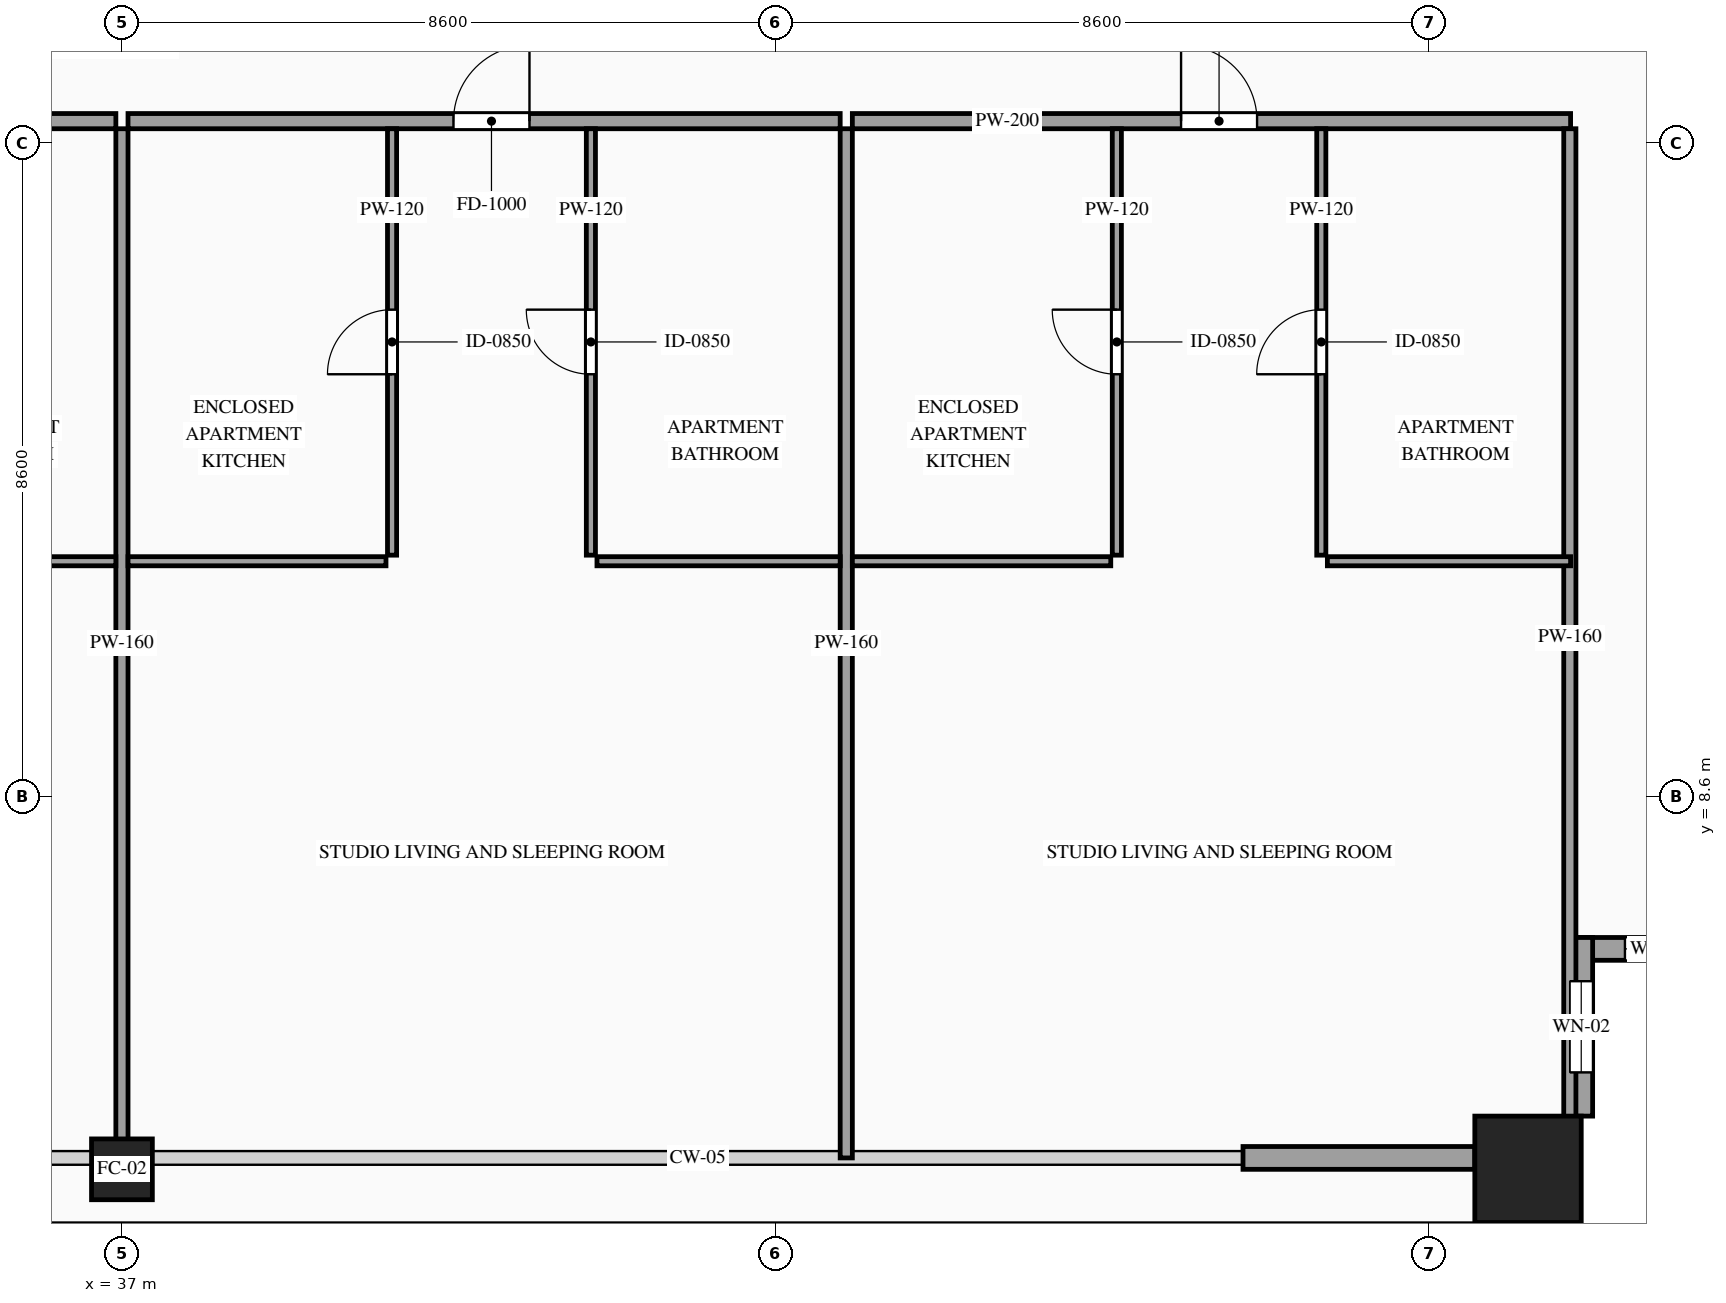
"""IFC4 building model, lengths in metres.
Left out: names, types, materials, properties, quantities, classifications, styles, units other than length and angle.
Written with IfcOpenShell. Run it as: python <this file> out.ifc"""

import sys

from ifc_helpers import new_model, si_unit, direction, frame, frame_2d, origin, origin_2d, place, context, subcontext, project, spatial, rectangle, hollow_rectangle, extrude, source, transform, mapped, element, fill, save


model = new_model("IFC4")
c1 = context("Model", 3, precision=1e-05, world=origin(), true_north=direction((0.0, 1.0)))
c2 = subcontext(c1, "Body", "Model", "MODEL_VIEW")
j1 = project(units=[si_unit("LENGTHUNIT", "METRE"), si_unit("PLANEANGLEUNIT", "RADIAN")], contexts=[c1])
p1 = place(None, origin())
s1 = spatial("IfcSite", under=j1, at=p1, CompositionType="ELEMENT")
p2 = place(p1, origin())
s2 = spatial("IfcBuilding", under=s1, at=p2, CompositionType="ELEMENT")
p3 = place(p2, frame((0.0, 0.0, 188.0)))
s3 = spatial("IfcBuildingStorey", under=s2, at=p3, CompositionType="ELEMENT", Elevation=188.0)
m1 = source(origin(), c2, "Body", "SweptSolid", [
    extrude(hollow_rectangle(XDim=0.8, YDim=0.8, WallThickness=0.036, at=origin_2d()), origin(), (0.0, 0.0, 1.0), 3.5),
])
p4 = place(p3, frame((37.0, 3.7, 0.0), z_axis=(0.0, 0.0, 1.0), x_axis=(1.0, 0.0, 0.0)))
e1 = element("IfcColumn", 1, at=p4, inside=s3, PredefinedType="COLUMN", context=c2, shape_type="MappedRepresentation", body=[
    mapped(m1, transform((0.0, 0.0, 0.0), scale=1.0)),
])
m2 = source(origin(), c2, "Body", "SweptSolid", [
    extrude(hollow_rectangle(XDim=1.4, YDim=1.4, WallThickness=0.06, at=origin_2d()), origin(), (0.0, 0.0, 1.0), 3.5),
])
p5 = place(p3, frame((55.5, 3.7, 0.0), z_axis=(0.0, 0.0, 1.0), x_axis=(1.0, 0.0, 0.0)))
e2 = element("IfcColumn", 2, at=p5, inside=s3, PredefinedType="COLUMN", context=c2, shape_type="MappedRepresentation", body=[
    mapped(m2, transform((0.0, 0.0, 0.0), scale=1.0)),
])
p6 = place(p3, frame((56.05, 6.6, 0.0), z_axis=(0.0, 0.0, 1.0), x_axis=(1.0, 0.0, 0.0)))
e3 = element("IfcWall", 3, at=p6, inside=s3, PredefinedType="SOLIDWALL", context=c2, shape_type="SweptSolid", body=[
    extrude(rectangle(XDim=2.35, YDim=0.3, at=frame_2d((1.175, 0.0))), origin(), (0.0, 0.0, 1.0), 3.28),
])
p7 = place(p6, frame((0.725, 0.0, 0.85)))
e4 = element("IfcOpeningElement", 4, at=p7, cuts=e3, PredefinedType="OPENING", context=c2, shape_type="SweptSolid", body=[
    extrude(rectangle(XDim=0.9, YDim=1.5, at=frame_2d((0.45, 0.75))), frame((0.0, 0.165, 0.0), z_axis=(0.0, -1.0, 0.0), x_axis=(1.0, 0.0, 0.0)), (0.0, 0.0, 1.0), 0.33),
])
p8 = place(p3, frame((56.2, 4.4, 0.0), z_axis=(0.0, 0.0, 1.0), x_axis=(0.0, 1.0, 0.0)))
e5 = element("IfcWall", 5, at=p8, inside=s3, PredefinedType="SOLIDWALL", context=c2, shape_type="SweptSolid", body=[
    extrude(rectangle(XDim=2.35, YDim=0.3, at=frame_2d((1.175, 0.0))), origin(), (0.0, 0.0, 1.0), 3.28),
])
p9 = place(p8, frame((0.575, 0.0, 0.85)))
e6 = element("IfcOpeningElement", 6, at=p9, cuts=e5, PredefinedType="OPENING", context=c2, shape_type="SweptSolid", body=[
    extrude(rectangle(XDim=1.2, YDim=2.1, at=frame_2d((0.6, 1.05))), frame((0.0, 0.165, 0.0), z_axis=(0.0, -1.0, 0.0), x_axis=(1.0, 0.0, 0.0)), (0.0, 0.0, 1.0), 0.33),
])
m3 = source(origin(), c2, "Body", "SweptSolid", [
    extrude(rectangle(XDim=3.05, YDim=0.3, at=frame_2d((1.525, 0.0))), origin(), (0.0, 0.0, 1.0), 2.835),
])
p10 = place(p3, frame((51.75, 3.85, 0.0), z_axis=(0.0, 0.0, 1.0), x_axis=(1.0, 0.0, 0.0)))
e7 = element("IfcWall", 7, at=p10, inside=s3, PredefinedType="SOLIDWALL", context=c2, shape_type="MappedRepresentation", body=[
    mapped(m3, transform((0.0, 0.0, 0.0), scale=1.0)),
])
p11 = place(p3, frame((27.55, 17.49, 0.0), z_axis=(0.0, 0.0, 1.0), x_axis=(1.0, 0.0, 0.0)))
e8 = element("IfcWall", 8, at=p11, inside=s3, PredefinedType="PARTITIONING", context=c2, shape_type="SweptSolid", body=[
    extrude(rectangle(XDim=9.37, YDim=0.2, at=frame_2d((4.685, 0.0))), origin(), (0.0, 0.0, 1.0), 3.28),
])
p12 = place(p11, frame((4.282, 0.0, 0.0)))
e9 = element("IfcOpeningElement", 9, at=p12, cuts=e8, PredefinedType="OPENING", context=c2, shape_type="SweptSolid", body=[
    extrude(rectangle(XDim=1.0, YDim=2.2, at=frame_2d((0.5, 1.1))), frame((0.0, 0.115, 0.0), z_axis=(0.0, -1.0, 0.0), x_axis=(1.0, 0.0, 0.0)), (0.0, 0.0, 1.0), 0.23),
])
m4 = source(origin(), c2, "Body", "SweptSolid", [
    extrude(rectangle(XDim=13.54, YDim=0.16, at=frame_2d((6.77, 0.0))), origin(), (0.0, 0.0, 1.0), 2.687),
])
p13 = place(p3, frame((37.0, 3.85, 0.0), z_axis=(0.0, 0.0, 1.0), x_axis=(0.0, 1.0, 0.0)))
e10 = element("IfcWall", 10, at=p13, inside=s3, PredefinedType="PARTITIONING", context=c2, shape_type="MappedRepresentation", body=[
    mapped(m4, transform((0.0, 0.0, 0.0), scale=1.0)),
])
m5 = source(origin(), c2, "Body", "SweptSolid", [
    extrude(rectangle(XDim=3.2, YDim=0.12, at=frame_2d((1.6, 0.0))), origin(), (0.0, 0.0, 1.0), 2.875),
])
p14 = place(p3, frame((33.72, 11.7, 0.0), z_axis=(0.0, 0.0, 1.0), x_axis=(1.0, 0.0, 0.0)))
e11 = element("IfcWall", 11, at=p14, inside=s3, PredefinedType="PARTITIONING", context=c2, shape_type="MappedRepresentation", body=[
    mapped(m5, transform((0.0, 0.0, 0.0), scale=1.0)),
])
p15 = place(p3, frame((37.08, 17.49, 0.0), z_axis=(0.0, 0.0, 1.0), x_axis=(1.0, 0.0, 0.0)))
e12 = element("IfcWall", 12, at=p15, inside=s3, PredefinedType="PARTITIONING", context=c2, shape_type="SweptSolid", body=[
    extrude(rectangle(XDim=9.37, YDim=0.2, at=frame_2d((4.685, 0.0))), origin(), (0.0, 0.0, 1.0), 3.28),
])
p16 = place(p15, frame((4.282, 0.0, 0.0)))
e13 = element("IfcOpeningElement", 13, at=p16, cuts=e12, PredefinedType="OPENING", context=c2, shape_type="SweptSolid", body=[
    extrude(rectangle(XDim=1.0, YDim=2.2, at=frame_2d((0.5, 1.1))), frame((0.0, 0.115, 0.0), z_axis=(0.0, -1.0, 0.0), x_axis=(1.0, 0.0, 0.0)), (0.0, 0.0, 1.0), 0.23),
])
m6 = source(origin(), c2, "Body", "SweptSolid", [
    extrude(rectangle(XDim=13.54, YDim=0.16, at=frame_2d((6.77, 0.0))), origin(), (0.0, 0.0, 1.0), 3.28),
])
p17 = place(p3, frame((46.53, 3.85, 0.0), z_axis=(0.0, 0.0, 1.0), x_axis=(0.0, 1.0, 0.0)))
e14 = element("IfcWall", 14, at=p17, inside=s3, PredefinedType="PARTITIONING", context=c2, shape_type="MappedRepresentation", body=[
    mapped(m6, transform((0.0, 0.0, 0.0), scale=1.0)),
])
m7 = source(origin(), c2, "Body", "SweptSolid", [
    extrude(rectangle(XDim=3.394, YDim=0.12, at=frame_2d((1.697, 0.0))), origin(), (0.0, 0.0, 1.0), 2.875),
])
p18 = place(p3, frame((37.08, 11.7, 0.0), z_axis=(0.0, 0.0, 1.0), x_axis=(1.0, 0.0, 0.0)))
e15 = element("IfcWall", 15, at=p18, inside=s3, PredefinedType="PARTITIONING", context=c2, shape_type="MappedRepresentation", body=[
    mapped(m7, transform((0.0, 0.0, 0.0), scale=1.0)),
])
p19 = place(p3, frame((40.554, 11.78, 0.0), z_axis=(0.0, 0.0, 1.0), x_axis=(0.0, 1.0, 0.0)))
e16 = element("IfcWall", 16, at=p19, inside=s3, PredefinedType="PARTITIONING", context=c2, shape_type="SweptSolid", body=[
    extrude(rectangle(XDim=5.61, YDim=0.12, at=frame_2d((2.805, 0.0))), origin(), (0.0, 0.0, 1.0), 3.28),
])
p20 = place(p19, frame((2.38, 0.0, 0.0)))
e17 = element("IfcOpeningElement", 17, at=p20, cuts=e16, PredefinedType="OPENING", context=c2, shape_type="SweptSolid", body=[
    extrude(rectangle(XDim=0.85, YDim=2.1, at=frame_2d((0.425, 1.05))), frame((0.0, 0.075, 0.0), z_axis=(0.0, -1.0, 0.0), x_axis=(1.0, 0.0, 0.0)), (0.0, 0.0, 1.0), 0.15),
])
p21 = place(p3, frame((43.25, 11.7, 0.0), z_axis=(0.0, 0.0, 1.0), x_axis=(1.0, 0.0, 0.0)))
e18 = element("IfcWall", 18, at=p21, inside=s3, PredefinedType="PARTITIONING", context=c2, shape_type="MappedRepresentation", body=[
    mapped(m5, transform((0.0, 0.0, 0.0), scale=1.0)),
])
p22 = place(p3, frame((43.17, 11.78, 0.0), z_axis=(0.0, 0.0, 1.0), x_axis=(0.0, 1.0, 0.0)))
e19 = element("IfcWall", 19, at=p22, inside=s3, PredefinedType="PARTITIONING", context=c2, shape_type="SweptSolid", body=[
    extrude(rectangle(XDim=5.61, YDim=0.12, at=frame_2d((2.805, 0.0))), origin(), (0.0, 0.0, 1.0), 3.28),
])
p23 = place(p22, frame((2.38, 0.0, 0.0)))
e20 = element("IfcOpeningElement", 20, at=p23, cuts=e19, PredefinedType="OPENING", context=c2, shape_type="SweptSolid", body=[
    extrude(rectangle(XDim=0.85, YDim=2.1, at=frame_2d((0.425, 1.05))), frame((0.0, 0.075, 0.0), z_axis=(0.0, -1.0, 0.0), x_axis=(1.0, 0.0, 0.0)), (0.0, 0.0, 1.0), 0.15),
])
p24 = place(p3, frame((46.61, 17.49, 0.0), z_axis=(0.0, 0.0, 1.0), x_axis=(1.0, 0.0, 0.0)))
e21 = element("IfcWall", 21, at=p24, inside=s3, PredefinedType="PARTITIONING", context=c2, shape_type="SweptSolid", body=[
    extrude(rectangle(XDim=9.45, YDim=0.2, at=frame_2d((4.725, 0.0))), origin(), (0.0, 0.0, 1.0), 3.28),
])
p25 = place(p24, frame((4.325, 0.0, 0.0)))
e22 = element("IfcOpeningElement", 22, at=p25, cuts=e21, PredefinedType="OPENING", context=c2, shape_type="SweptSolid", body=[
    extrude(rectangle(XDim=1.0, YDim=2.2, at=frame_2d((0.5, 1.1))), frame((0.0, 0.115, 0.0), z_axis=(0.0, -1.0, 0.0), x_axis=(1.0, 0.0, 0.0)), (0.0, 0.0, 1.0), 0.23),
])
m8 = source(origin(), c2, "Body", "SweptSolid", [
    extrude(rectangle(XDim=13.39, YDim=0.16, at=frame_2d((6.695, 0.0))), origin(), (0.0, 0.0, 1.0), 3.28),
])
p26 = place(p3, frame((56.05, 4.0, 0.0), z_axis=(0.0, 0.0, 1.0), x_axis=(0.0, 1.0, 0.0)))
e23 = element("IfcWall", 23, at=p26, inside=s3, PredefinedType="PARTITIONING", context=c2, shape_type="MappedRepresentation", body=[
    mapped(m8, transform((0.0, 0.0, 0.0), scale=1.0)),
])
m9 = source(origin(), c2, "Body", "SweptSolid", [
    extrude(rectangle(XDim=3.4, YDim=0.12, at=frame_2d((1.7, 0.0))), origin(), (0.0, 0.0, 1.0), 2.875),
])
p27 = place(p3, frame((46.61, 11.7, 0.0), z_axis=(0.0, 0.0, 1.0), x_axis=(1.0, 0.0, 0.0)))
e24 = element("IfcWall", 24, at=p27, inside=s3, PredefinedType="PARTITIONING", context=c2, shape_type="MappedRepresentation", body=[
    mapped(m9, transform((0.0, 0.0, 0.0), scale=1.0)),
])
p28 = place(p3, frame((50.09, 11.78, 0.0), z_axis=(0.0, 0.0, 1.0), x_axis=(0.0, 1.0, 0.0)))
e25 = element("IfcWall", 25, at=p28, inside=s3, PredefinedType="PARTITIONING", context=c2, shape_type="SweptSolid", body=[
    extrude(rectangle(XDim=5.61, YDim=0.12, at=frame_2d((2.805, 0.0))), origin(), (0.0, 0.0, 1.0), 2.775),
])
p29 = place(p28, frame((2.38, 0.0, 0.0)))
e26 = element("IfcOpeningElement", 26, at=p29, cuts=e25, PredefinedType="OPENING", context=c2, shape_type="SweptSolid", body=[
    extrude(rectangle(XDim=0.85, YDim=2.1, at=frame_2d((0.425, 1.05))), frame((0.0, 0.075, 0.0), z_axis=(0.0, -1.0, 0.0), x_axis=(1.0, 0.0, 0.0)), (0.0, 0.0, 1.0), 0.15),
])
m10 = source(origin(), c2, "Body", "SweptSolid", [
    extrude(rectangle(XDim=3.2, YDim=0.12, at=frame_2d((1.6, 0.0))), origin(), (0.0, 0.0, 1.0), 3.28),
])
p30 = place(p3, frame((52.86, 11.7, 0.0), z_axis=(0.0, 0.0, 1.0), x_axis=(1.0, 0.0, 0.0)))
e27 = element("IfcWall", 27, at=p30, inside=s3, PredefinedType="PARTITIONING", context=c2, shape_type="MappedRepresentation", body=[
    mapped(m10, transform((0.0, 0.0, 0.0), scale=1.0)),
])
p31 = place(p3, frame((52.78, 11.78, 0.0), z_axis=(0.0, 0.0, 1.0), x_axis=(0.0, 1.0, 0.0)))
e28 = element("IfcWall", 28, at=p31, inside=s3, PredefinedType="PARTITIONING", context=c2, shape_type="SweptSolid", body=[
    extrude(rectangle(XDim=5.61, YDim=0.12, at=frame_2d((2.805, 0.0))), origin(), (0.0, 0.0, 1.0), 3.28),
])
p32 = place(p31, frame((2.38, 0.0, 0.0)))
e29 = element("IfcOpeningElement", 29, at=p32, cuts=e28, PredefinedType="OPENING", context=c2, shape_type="SweptSolid", body=[
    extrude(rectangle(XDim=0.85, YDim=2.1, at=frame_2d((0.425, 1.05))), frame((0.0, 0.075, 0.0), z_axis=(0.0, -1.0, 0.0), x_axis=(1.0, 0.0, 0.0)), (0.0, 0.0, 1.0), 0.15),
])
m11 = source(origin(), c2, "Body", "SweptSolid", [
    extrude(rectangle(XDim=0.9, YDim=1.5, at=frame_2d((0.45, 0.75))), frame((0.0, 0.03, 0.0), z_axis=(0.0, -1.0, 0.0), x_axis=(1.0, 0.0, 0.0)), (0.0, 0.0, 1.0), 0.06),
])
p33 = place(p7, origin())
e30 = element("IfcWindow", 30, at=p33, inside=s3, PartitioningType="SINGLE_PANEL", PredefinedType="WINDOW", context=c2, shape_type="MappedRepresentation", body=[
    mapped(m11, transform((0.0, 0.0, 0.0), scale=1.0)),
])
fill(e4, e30)
m12 = source(origin(), c2, "Body", "SweptSolid", [
    extrude(rectangle(XDim=1.2, YDim=2.1, at=frame_2d((0.6, 1.05))), frame((0.0, 0.03, 0.0), z_axis=(0.0, -1.0, 0.0), x_axis=(1.0, 0.0, 0.0)), (0.0, 0.0, 1.0), 0.06),
])
p34 = place(p9, origin())
e31 = element("IfcWindow", 31, at=p34, inside=s3, PartitioningType="SINGLE_PANEL", PredefinedType="WINDOW", context=c2, shape_type="MappedRepresentation", body=[
    mapped(m12, transform((0.0, 0.0, 0.0), scale=1.0)),
])
fill(e6, e31)
m13 = source(origin(), c2, "Body", "SweptSolid", [
    extrude(rectangle(XDim=1.0, YDim=2.2, at=frame_2d((0.5, 1.1))), frame((0.0, 0.025, 0.0), z_axis=(0.0, -1.0, 0.0), x_axis=(1.0, 0.0, 0.0)), (0.0, 0.0, 1.0), 0.05),
])
p35 = place(p16, origin())
e32 = element("IfcDoor", 32, at=p35, inside=s3, OperationType="SINGLE_SWING_RIGHT", PredefinedType="DOOR", context=c2, shape_type="MappedRepresentation", body=[
    mapped(m13, transform((0.0, 0.0, 0.0), scale=1.0)),
])
fill(e13, e32)
m14 = source(origin(), c2, "Body", "SweptSolid", [
    extrude(rectangle(XDim=0.85, YDim=2.1, at=frame_2d((0.425, 1.05))), frame((0.0, 0.025, 0.0), z_axis=(0.0, -1.0, 0.0), x_axis=(1.0, 0.0, 0.0)), (0.0, 0.0, 1.0), 0.05),
])
p36 = place(p20, origin())
e33 = element("IfcDoor", 33, at=p36, inside=s3, OperationType="SINGLE_SWING_LEFT", PredefinedType="DOOR", context=c2, shape_type="MappedRepresentation", body=[
    mapped(m14, transform((0.0, 0.0, 0.0), scale=1.0)),
])
fill(e17, e33)
p37 = place(p23, origin())
e34 = element("IfcDoor", 34, at=p37, inside=s3, OperationType="SINGLE_SWING_RIGHT", PredefinedType="DOOR", context=c2, shape_type="MappedRepresentation", body=[
    mapped(m14, transform((0.0, 0.0, 0.0), scale=1.0)),
])
fill(e20, e34)
p38 = place(p25, origin())
e35 = element("IfcDoor", 35, at=p38, inside=s3, OperationType="SINGLE_SWING_LEFT", PredefinedType="DOOR", context=c2, shape_type="MappedRepresentation", body=[
    mapped(m13, transform((0.0, 0.0, 0.0), scale=1.0)),
])
fill(e22, e35)
p39 = place(p29, origin())
e36 = element("IfcDoor", 36, at=p39, inside=s3, OperationType="SINGLE_SWING_RIGHT", PredefinedType="DOOR", context=c2, shape_type="MappedRepresentation", body=[
    mapped(m14, transform((0.0, 0.0, 0.0), scale=1.0)),
])
fill(e26, e36)
p40 = place(p32, origin())
e37 = element("IfcDoor", 37, at=p40, inside=s3, OperationType="SINGLE_SWING_LEFT", PredefinedType="DOOR", context=c2, shape_type="MappedRepresentation", body=[
    mapped(m14, transform((0.0, 0.0, 0.0), scale=1.0)),
])
fill(e29, e37)
save(model, sys.argv[1])
